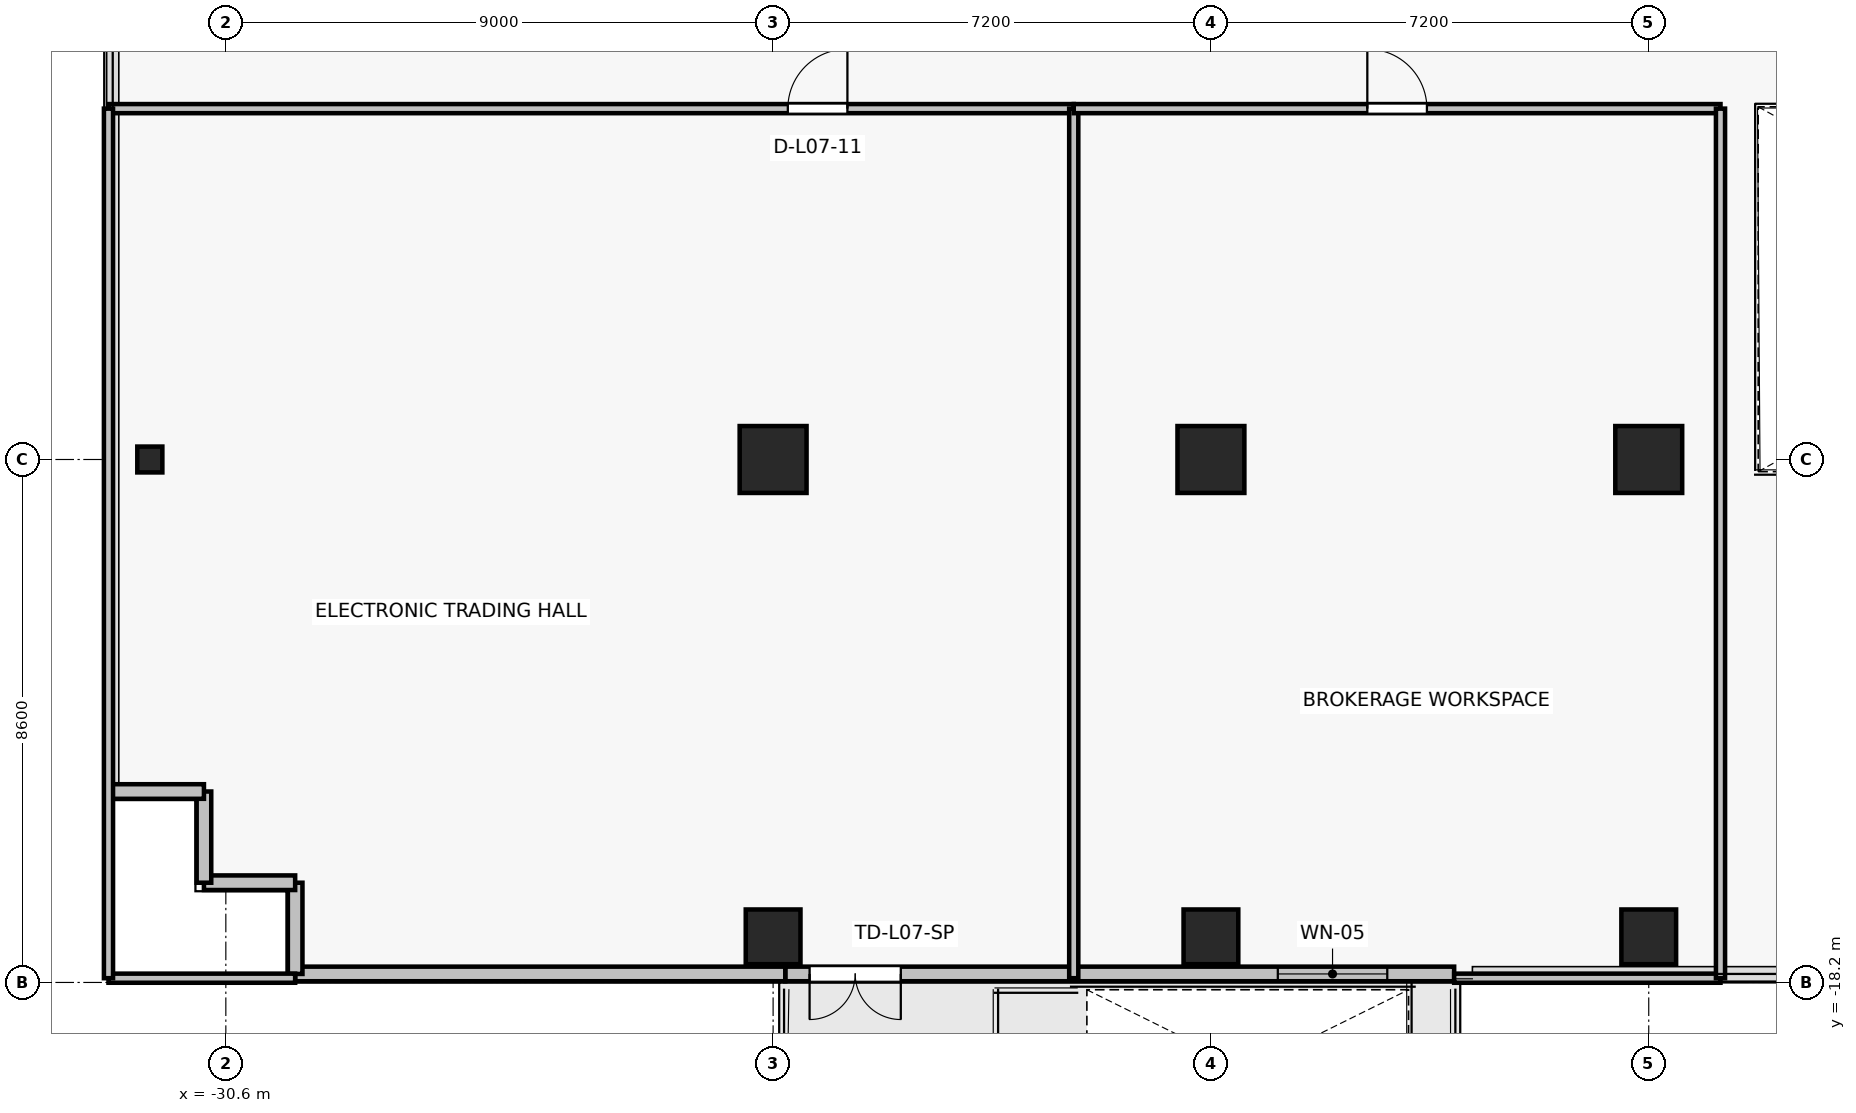
"""IFC4 building model, lengths in metres.
Left out: names, types, materials, properties, quantities, classifications, styles, units other than length and angle.
Written with IfcOpenShell. Run it as: python <this file> out.ifc"""

import sys

from ifc_helpers import new_model, si_unit, direction, frame, frame_2d, origin, origin_2d, place, context, subcontext, project, spatial, rectangle, i_section, extrude, source, transform, mapped, element, fill, save


model = new_model("IFC4")
c1 = context("Model", 3, precision=1e-05, world=origin(), true_north=direction((0.0, 1.0)))
c2 = subcontext(c1, "Body", "Model", "MODEL_VIEW")
j1 = project(units=[si_unit("LENGTHUNIT", "METRE"), si_unit("PLANEANGLEUNIT", "RADIAN")], contexts=[c1])
p1 = place(None, origin())
s1 = spatial("IfcSite", under=j1, at=p1, CompositionType="ELEMENT")
p2 = place(p1, origin())
s2 = spatial("IfcBuilding", under=s1, at=p2, CompositionType="ELEMENT")
p3 = place(p2, frame((0.0, 0.0, 30.7)))
s3 = spatial("IfcBuildingStorey", under=s2, at=p3, CompositionType="ELEMENT", Elevation=30.7)
for number, where, z_axis, x_axis in (
    (1, (-14.4, -9.6, 0.0), (0.0, 0.0, 1.0), (1.0, 0.0, 0.0)),
    (2, (-7.2, -9.6, 0.0), (0.0, 0.0, 1.0), (1.0, 0.0, 0.0)),
    (3, (-21.6, -9.6, 0.0), (0.0, 0.0, 1.0), (1.0, 0.0, 0.0)),
):
    element("IfcColumn", number, at=place(p3, frame(where, z_axis=z_axis, x_axis=x_axis)), inside=s3, PredefinedType="COLUMN", context=c2, shape_type="SweptSolid", body=[
        extrude(rectangle(XDim=1.1, YDim=1.1, at=origin_2d()), origin(), (0.0, 0.0, 1.0), 3.3),
    ])
for number, where, z_axis, x_axis in (
    (4, (-14.4, -17.45, 0.0), (0.0, 0.0, 1.0), (1.0, 0.0, 0.0)),
    (5, (-7.2, -17.45, 0.0), (0.0, 0.0, 1.0), (1.0, 0.0, 0.0)),
    (6, (-21.6, -17.45, 0.0), (0.0, 0.0, 1.0), (1.0, 0.0, 0.0)),
):
    element("IfcColumn", number, at=place(p3, frame(where, z_axis=z_axis, x_axis=x_axis)), inside=s3, PredefinedType="COLUMN", context=c2, shape_type="SweptSolid", body=[
        extrude(rectangle(XDim=0.9, YDim=0.9, at=origin_2d()), origin(), (0.0, 0.0, 1.0), 3.3),
    ])
p4 = place(p3, frame((-31.85, -9.6, 0.0), z_axis=(0.0, 0.0, 1.0), x_axis=(1.0, 0.0, 0.0)))
e7 = element("IfcColumn", 7, at=p4, inside=s3, PredefinedType="COLUMN", context=c2, shape_type="SweptSolid", body=[
    extrude(i_section(OverallWidth=0.412, OverallDepth=0.425, WebThickness=0.026, FlangeThickness=0.039, FilletRadius=0.015, at=origin_2d()), origin(), (0.0, 0.0, 1.0), 3.3),
])
p5 = place(p3, frame((-10.4, -18.06, 0.0), z_axis=(0.0, 0.0, 1.0), x_axis=(-1.0, 0.0, 0.0)))
e8 = element("IfcWall", 8, at=p5, inside=s3, PredefinedType="SOLIDWALL", context=c2, shape_type="SweptSolid", body=[
    extrude(rectangle(XDim=11.0, YDim=0.24, at=frame_2d((5.5, 0.0))), origin(), (0.0, 0.0, 1.0), 2.665),
])
p6 = place(p5, frame((9.1, 0.0, 0.0)))
e9 = element("IfcOpeningElement", 9, at=p6, cuts=e8, PredefinedType="OPENING", context=c2, shape_type="SweptSolid", body=[
    extrude(rectangle(XDim=1.5, YDim=2.2, at=frame_2d((0.75, 1.1))), frame((0.0, 0.13, 0.0), z_axis=(0.0, -1.0, 0.0), x_axis=(1.0, 0.0, 0.0)), (0.0, 0.0, 1.0), 0.26),
])
p7 = place(p5, frame((1.1, 0.0, 0.85)))
e10 = element("IfcOpeningElement", 10, at=p7, cuts=e8, PredefinedType="OPENING", context=c2, shape_type="SweptSolid", body=[
    extrude(rectangle(XDim=1.8, YDim=1.6, at=frame_2d((0.9, 0.8))), frame((0.0, 0.13, 0.0), z_axis=(0.0, -1.0, 0.0), x_axis=(1.0, 0.0, 0.0)), (0.0, 0.0, 1.0), 0.26),
])
p8 = place(p3, frame((-29.46, -18.06, 0.0), z_axis=(0.0, 0.0, 1.0), x_axis=(1.0, 0.0, 0.0)))
e11 = element("IfcWall", 11, at=p8, inside=s3, PredefinedType="SOLIDWALL", context=c2, shape_type="SweptSolid", body=[
    extrude(rectangle(XDim=8.06, YDim=0.24, at=frame_2d((4.03, 0.0))), origin(), (0.0, 0.0, 1.0), 3.075),
])
for number, where, z_axis, x_axis in (
    (12, (-29.46, -16.56, 0.0), (0.0, 0.0, 1.0), (0.0, -1.0, 0.0)),
    (13, (-30.96, -16.56, 0.0), (0.0, 0.0, 1.0), (1.0, 0.0, 0.0)),
    (14, (-30.96, -15.06, 0.0), (0.0, 0.0, 1.0), (0.0, -1.0, 0.0)),
    (15, (-32.46, -15.06, 0.0), (0.0, 0.0, 1.0), (1.0, 0.0, 0.0)),
):
    element("IfcWall", number, at=place(p3, frame(where, z_axis=z_axis, x_axis=x_axis)), inside=s3, PredefinedType="SOLIDWALL", context=c2, shape_type="SweptSolid", body=[
        extrude(rectangle(XDim=1.5, YDim=0.24, at=frame_2d((0.75, 0.0))), origin(), (0.0, 0.0, 1.0), 3.075),
    ])
p9 = place(p3, frame((-29.46, -18.13, 0.0), z_axis=(0.0, 0.0, 1.0), x_axis=(-1.0, 0.0, 0.0)))
e16 = element("IfcWall", 16, at=p9, inside=s3, PredefinedType="PARTITIONING", context=c2, shape_type="SweptSolid", body=[
    extrude(rectangle(XDim=3.07, YDim=0.15, at=frame_2d((1.535, 0.0))), origin(), (0.0, 0.0, 1.0), 2.665),
])
p10 = place(p3, frame((-32.53, -3.83, 0.0), z_axis=(0.0, 0.0, 1.0), x_axis=(1.0, 0.0, 0.0)))
e17 = element("IfcWall", 17, at=p10, inside=s3, PredefinedType="PARTITIONING", context=c2, shape_type="SweptSolid", body=[
    extrude(rectangle(XDim=15.874, YDim=0.15, at=frame_2d((7.937, 0.0))), origin(), (0.0, 0.0, 1.0), 2.465),
])
p11 = place(p10, frame((11.172, 0.0, 0.0)))
e18 = element("IfcOpeningElement", 18, at=p11, cuts=e17, PredefinedType="OPENING", context=c2, shape_type="SweptSolid", body=[
    extrude(rectangle(XDim=0.98, YDim=2.15, at=frame_2d((0.49, 1.075))), frame((0.0, 0.085, 0.0), z_axis=(0.0, -1.0, 0.0), x_axis=(1.0, 0.0, 0.0)), (0.0, 0.0, 1.0), 0.17),
])
p12 = place(p3, frame((-32.53, -18.13, 0.0), z_axis=(0.0, 0.0, 1.0), x_axis=(0.0, 1.0, 0.0)))
e19 = element("IfcWall", 19, at=p12, inside=s3, PredefinedType="PARTITIONING", context=c2, shape_type="SweptSolid", body=[
    extrude(rectangle(XDim=14.3, YDim=0.15, at=frame_2d((7.15, 0.0))), origin(), (0.0, 0.0, 1.0), 2.665),
])
p13 = place(p3, frame((-16.656, -3.83, 0.0), z_axis=(0.0, 0.0, 1.0), x_axis=(0.0, -1.0, 0.0)))
e20 = element("IfcWall", 20, at=p13, inside=s3, PredefinedType="PARTITIONING", context=c2, shape_type="SweptSolid", body=[
    extrude(rectangle(XDim=14.3, YDim=0.15, at=frame_2d((7.15, 0.0))), origin(), (0.0, 0.0, 1.0), 2.465),
])
p14 = place(p3, frame((-6.02, -18.13, 0.0), z_axis=(0.0, 0.0, 1.0), x_axis=(-1.0, 0.0, 0.0)))
e21 = element("IfcWall", 21, at=p14, inside=s3, PredefinedType="PARTITIONING", context=c2, shape_type="SweptSolid", body=[
    extrude(rectangle(XDim=4.38, YDim=0.15, at=frame_2d((2.19, 0.0))), origin(), (0.0, 0.0, 1.0), 2.665),
])
p15 = place(p3, frame((-16.656, -3.83, 0.0), z_axis=(0.0, 0.0, 1.0), x_axis=(1.0, 0.0, 0.0)))
e22 = element("IfcWall", 22, at=p15, inside=s3, PredefinedType="PARTITIONING", context=c2, shape_type="SweptSolid", body=[
    extrude(rectangle(XDim=10.636, YDim=0.15, at=frame_2d((5.318, 0.0))), origin(), (0.0, 0.0, 1.0), 2.465),
])
p16 = place(p15, frame((4.828, 0.0, 0.0)))
e23 = element("IfcOpeningElement", 23, at=p16, cuts=e22, PredefinedType="OPENING", context=c2, shape_type="SweptSolid", body=[
    extrude(rectangle(XDim=0.98, YDim=2.15, at=frame_2d((0.49, 1.075))), frame((0.0, 0.085, 0.0), z_axis=(0.0, -1.0, 0.0), x_axis=(1.0, 0.0, 0.0)), (0.0, 0.0, 1.0), 0.17),
])
p17 = place(p3, frame((-6.02, -3.83, 0.0), z_axis=(0.0, 0.0, 1.0), x_axis=(0.0, -1.0, 0.0)))
e24 = element("IfcWall", 24, at=p17, inside=s3, PredefinedType="PARTITIONING", context=c2, shape_type="SweptSolid", body=[
    extrude(rectangle(XDim=14.3, YDim=0.15, at=frame_2d((7.15, 0.0))), origin(), (0.0, 0.0, 1.0), 2.465),
])
m1 = source(origin(), c2, "Body", "SweptSolid", [
    extrude(rectangle(XDim=1.5, YDim=2.2, at=frame_2d((0.75, 1.1))), frame((0.0, 0.025, 0.0), z_axis=(0.0, -1.0, 0.0), x_axis=(1.0, 0.0, 0.0)), (0.0, 0.0, 1.0), 0.05),
])
p18 = place(p6, origin())
e25 = element("IfcDoor", 25, at=p18, inside=s3, OperationType="DOUBLE_DOOR_SINGLE_SWING", PredefinedType="DOOR", context=c2, shape_type="MappedRepresentation", body=[
    mapped(m1, transform((0.0, 0.0, 0.0), x_axis=(1.0, 0.0, 0.0), y_axis=(0.0, 1.0, 0.0), z_axis=(0.0, 0.0, 1.0), scale=1.0)),
])
fill(e9, e25)
m2 = source(origin(), c2, "Body", "SweptSolid", [
    extrude(rectangle(XDim=1.8, YDim=1.6, at=frame_2d((0.9, 0.8))), frame((0.0, 0.03, 0.0), z_axis=(0.0, -1.0, 0.0), x_axis=(1.0, 0.0, 0.0)), (0.0, 0.0, 1.0), 0.06),
])
p19 = place(p7, origin())
e26 = element("IfcWindow", 26, at=p19, inside=s3, PartitioningType="SINGLE_PANEL", PredefinedType="WINDOW", context=c2, shape_type="MappedRepresentation", body=[
    mapped(m2, transform((0.0, 0.0, 0.0), x_axis=(1.0, 0.0, 0.0), y_axis=(0.0, 1.0, 0.0), z_axis=(0.0, 0.0, 1.0), scale=1.0)),
])
fill(e10, e26)
m3 = source(origin(), c2, "Body", "SweptSolid", [
    extrude(rectangle(XDim=0.98, YDim=2.15, at=frame_2d((0.49, 1.075))), frame((0.0, 0.025, 0.0), z_axis=(0.0, -1.0, 0.0), x_axis=(1.0, 0.0, 0.0)), (0.0, 0.0, 1.0), 0.05),
])
p20 = place(p11, origin())
e27 = element("IfcDoor", 27, at=p20, inside=s3, OperationType="SINGLE_SWING_RIGHT", PredefinedType="DOOR", context=c2, shape_type="MappedRepresentation", body=[
    mapped(m3, transform((0.0, 0.0, 0.0), x_axis=(1.0, 0.0, 0.0), y_axis=(0.0, 1.0, 0.0), z_axis=(0.0, 0.0, 1.0), scale=1.0)),
])
fill(e18, e27)
p21 = place(p16, origin())
e28 = element("IfcDoor", 28, at=p21, inside=s3, OperationType="SINGLE_SWING_LEFT", PredefinedType="DOOR", context=c2, shape_type="MappedRepresentation", body=[
    mapped(m3, transform((0.0, 0.0, 0.0), x_axis=(1.0, 0.0, 0.0), y_axis=(0.0, 1.0, 0.0), z_axis=(0.0, 0.0, 1.0), scale=1.0)),
])
fill(e23, e28)
save(model, sys.argv[1])
